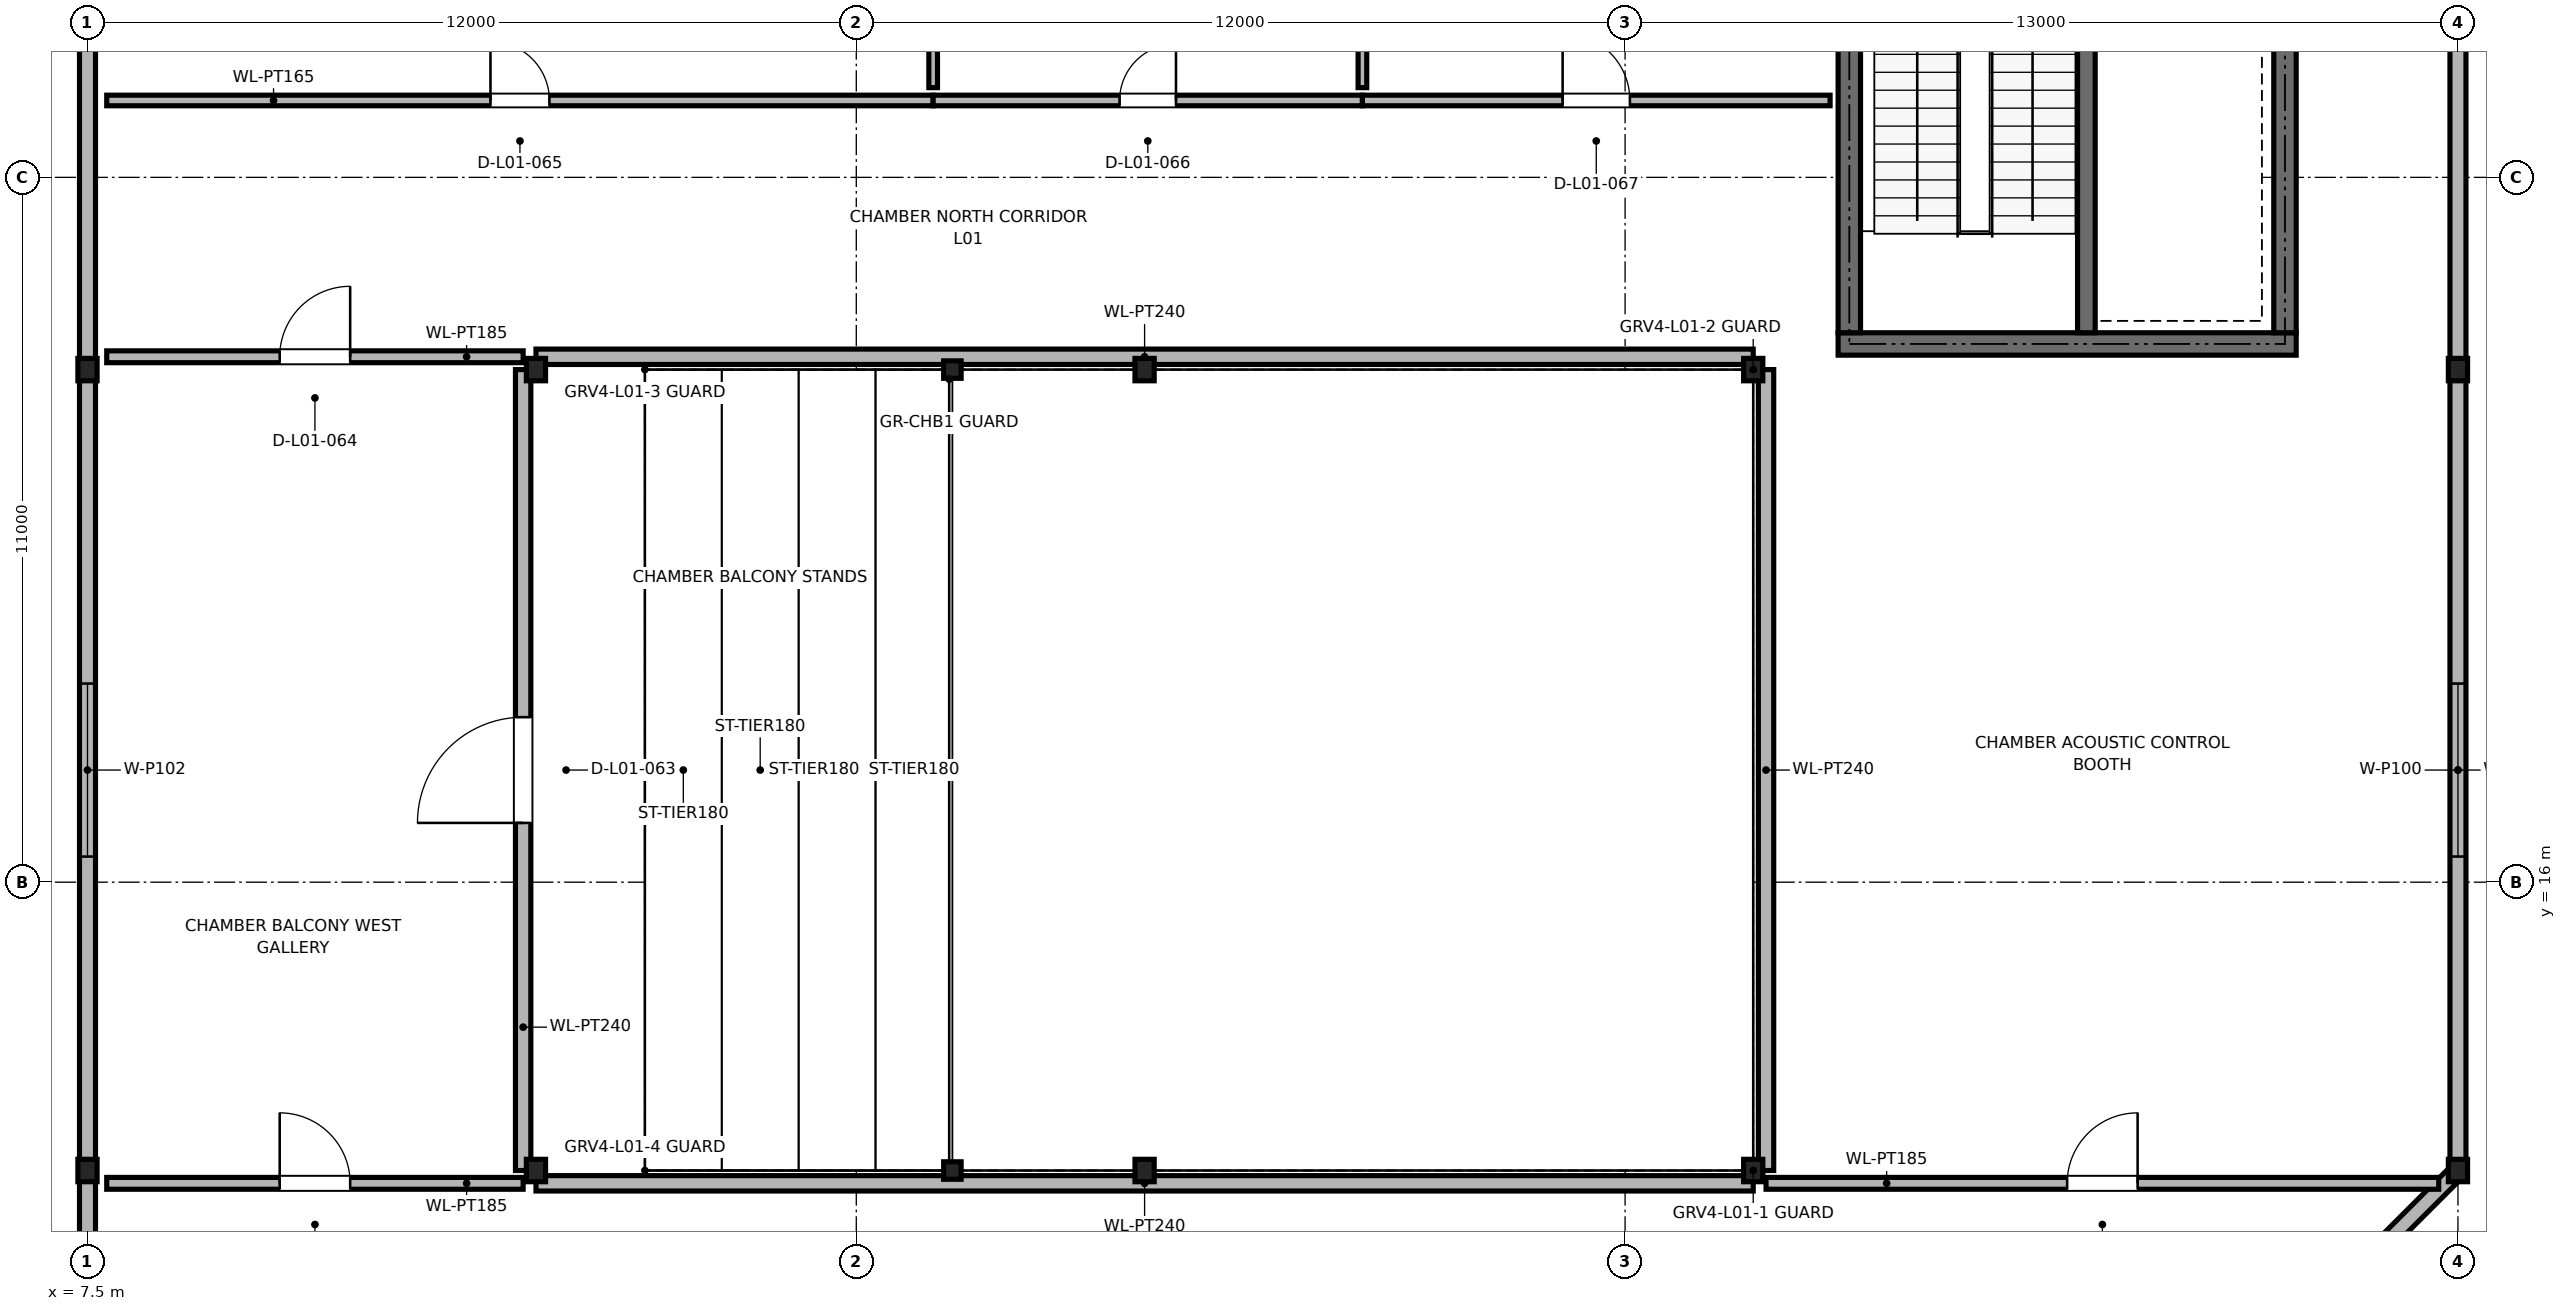
"""IFC4 building model, lengths in metres.
Left out: names, types, materials, properties, quantities, classifications, styles, units other than length and angle.
Written with IfcOpenShell. Run it as: python <this file> out.ifc"""

import sys

from ifc_helpers import new_model, si_unit, direction, frame, frame_2d, origin, origin_2d, place, context, subcontext, project, spatial, rectangle, hollow_circle, i_section, extrude, element, fill, save


model = new_model("IFC4")
c1 = context("Model", 3, precision=1e-05, world=origin(), true_north=direction((0.0, 1.0)))
c2 = subcontext(c1, "Body", "Model", "MODEL_VIEW")
j1 = project(units=[si_unit("LENGTHUNIT", "METRE"), si_unit("PLANEANGLEUNIT", "RADIAN")], contexts=[c1])
p1 = place(None, origin())
s1 = spatial("IfcSite", under=j1, at=p1, CompositionType="ELEMENT")
p2 = place(p1, origin())
s2 = spatial("IfcBuilding", under=s1, at=p2, CompositionType="ELEMENT")
p3 = place(p2, frame((0.0, 0.0, 4.8)))
s3 = spatial("IfcBuildingStorey", under=s2, at=p3, CompositionType="ELEMENT", Elevation=4.8)
for number, where, z_axis, x_axis in (
    (1, (44.5, 11.5, 0.0), (0.0, 0.0, 1.0), (1.0, 0.0, 0.0)),
    (2, (44.5, 24.0, 0.0), (0.0, 0.0, 1.0), (1.0, 0.0, 0.0)),
    (3, (7.5, 24.0, 0.0), (0.0, 0.0, 1.0), (1.0, 0.0, 0.0)),
    (4, (7.5, 11.5, 0.0), (0.0, 0.0, 1.0), (1.0, 0.0, 0.0)),
    (5, (14.5, 11.5, 0.0), (0.0, 0.0, 1.0), (1.0, 0.0, 0.0)),
    (6, (24.0, 11.5, 0.0), (0.0, 0.0, 1.0), (1.0, 0.0, 0.0)),
    (7, (33.5, 11.5, 0.0), (0.0, 0.0, 1.0), (1.0, 0.0, 0.0)),
    (8, (14.5, 24.0, 0.0), (0.0, 0.0, 1.0), (1.0, 0.0, 0.0)),
    (9, (24.0, 24.0, 0.0), (0.0, 0.0, 1.0), (1.0, 0.0, 0.0)),
    (10, (33.5, 24.0, 0.0), (0.0, 0.0, 1.0), (1.0, 0.0, 0.0)),
):
    element("IfcColumn", number, at=place(p3, frame(where, z_axis=z_axis, x_axis=x_axis)), inside=s3, PredefinedType="COLUMN", context=c2, shape_type="SweptSolid", body=[
        extrude(i_section(OverallWidth=0.3, OverallDepth=0.35, WebThickness=0.01, FlangeThickness=0.018, FilletRadius=0.027, at=origin_2d()), origin(), (0.0, 0.0, 1.0), 4.8),
    ])
for number, where, z_axis, x_axis in (
    (11, (21.0, 11.5, 0.0), (0.0, 0.0, 1.0), (1.0, 0.0, 0.0)),
    (12, (21.0, 24.0, 0.0), (0.0, 0.0, 1.0), (1.0, 0.0, 0.0)),
):
    element("IfcColumn", number, at=place(p3, frame(where, z_axis=z_axis, x_axis=x_axis)), inside=s3, PredefinedType="COLUMN", context=c2, shape_type="SweptSolid", body=[
        extrude(hollow_circle(Radius=0.136, WallThickness=0.016, at=origin_2d()), origin(), (0.0, 0.0, 1.0), 0.96),
    ])
p4 = place(p3, frame((44.486, 11.486, 0.0), z_axis=(0.0, 0.0, 1.0), x_axis=(-0.707106781187, -0.707106781187, 0.0)))
e13 = element("IfcWall", 13, at=p4, inside=s3, PredefinedType="SOLIDWALL", context=c2, shape_type="SweptSolid", body=[
    extrude(rectangle(XDim=9.152, YDim=0.25, at=frame_2d((4.576, 0.0))), origin(), (0.0, 0.0, 1.0), 4.028),
])
p5 = place(p3, frame((44.5, 23.98, 0.0), z_axis=(0.0, 0.0, 1.0), x_axis=(0.0, -1.0, 0.0)))
e14 = element("IfcWall", 14, at=p5, inside=s3, PredefinedType="SOLIDWALL", context=c2, shape_type="SweptSolid", body=[
    extrude(rectangle(XDim=12.46, YDim=0.25, at=frame_2d((6.23, 0.0))), origin(), (0.0, 0.0, 1.0), 4.028),
])
p6 = place(p5, frame((4.88, 0.0, 0.85)))
e15 = element("IfcOpeningElement", 15, at=p6, cuts=e14, PredefinedType="OPENING", context=c2, shape_type="SweptSolid", body=[
    extrude(rectangle(XDim=2.7, YDim=1.7, at=frame_2d((1.35, 0.85))), frame((0.0, 0.135, 0.0), z_axis=(0.0, -1.0, 0.0), x_axis=(1.0, 0.0, 0.0)), (0.0, 0.0, 1.0), 0.27),
])
p7 = place(p3, frame((44.5, 29.98, 0.0), z_axis=(0.0, 0.0, 1.0), x_axis=(0.0, -1.0, 0.0)))
e16 = element("IfcWall", 16, at=p7, inside=s3, PredefinedType="SOLIDWALL", context=c2, shape_type="SweptSolid", body=[
    extrude(rectangle(XDim=5.96, YDim=0.25, at=frame_2d((2.98, 0.0))), origin(), (0.0, 0.0, 1.0), 4.078),
])
p8 = place(p3, frame((7.5, 24.02, 0.0), z_axis=(0.0, 0.0, 1.0), x_axis=(0.0, 1.0, 0.0)))
e17 = element("IfcWall", 17, at=p8, inside=s3, PredefinedType="SOLIDWALL", context=c2, shape_type="SweptSolid", body=[
    extrude(rectangle(XDim=13.96, YDim=0.25, at=frame_2d((6.98, 0.0))), origin(), (0.0, 0.0, 1.0), 4.078),
])
p9 = place(p3, frame((7.5, 11.52, 0.0), z_axis=(0.0, 0.0, 1.0), x_axis=(0.0, 1.0, 0.0)))
e18 = element("IfcWall", 18, at=p9, inside=s3, PredefinedType="SOLIDWALL", context=c2, shape_type="SweptSolid", body=[
    extrude(rectangle(XDim=12.46, YDim=0.25, at=frame_2d((6.23, 0.0))), origin(), (0.0, 0.0, 1.0), 4.078),
])
p10 = place(p9, frame((4.88, 0.0, 0.85)))
e19 = element("IfcOpeningElement", 19, at=p10, cuts=e18, PredefinedType="OPENING", context=c2, shape_type="SweptSolid", body=[
    extrude(rectangle(XDim=2.7, YDim=1.7, at=frame_2d((1.35, 0.85))), frame((0.0, 0.135, 0.0), z_axis=(0.0, -1.0, 0.0), x_axis=(1.0, 0.0, 0.0)), (0.0, 0.0, 1.0), 0.27),
])
p11 = place(p3, frame((7.5, 5.02, 0.0), z_axis=(0.0, 0.0, 1.0), x_axis=(0.0, 1.0, 0.0)))
e20 = element("IfcWall", 20, at=p11, inside=s3, PredefinedType="SOLIDWALL", context=c2, shape_type="SweptSolid", body=[
    extrude(rectangle(XDim=6.46, YDim=0.25, at=frame_2d((3.23, 0.0))), origin(), (0.0, 0.0, 1.0), 4.078),
])
p12 = place(p3, frame((34.825, 24.4, 0.0), z_axis=(0.0, 0.0, 1.0), x_axis=(1.0, 0.0, 0.0)))
e21 = element("IfcWall", 21, at=p12, inside=s3, PredefinedType="SHEAR", context=c2, shape_type="SweptSolid", body=[
    extrude(rectangle(XDim=7.15, YDim=0.35, at=frame_2d((3.575, 0.0))), origin(), (0.0, 0.0, 1.0), 4.54),
])
for number, where, z_axis, x_axis in (
    (22, (35.0, 24.575, 0.0), (0.0, 0.0, 1.0), (0.0, 1.0, 0.0)),
    (23, (41.8, 24.575, 0.0), (0.0, 0.0, 1.0), (0.0, 1.0, 0.0)),
):
    element("IfcWall", number, at=place(p3, frame(where, z_axis=z_axis, x_axis=x_axis)), inside=s3, PredefinedType="SHEAR", context=c2, shape_type="SweptSolid", body=[
        extrude(rectangle(XDim=11.2, YDim=0.35, at=frame_2d((5.6, 0.0))), origin(), (0.0, 0.0, 1.0), 4.54),
    ])
p13 = place(p3, frame((38.7, 24.575, 0.0), z_axis=(0.0, 0.0, 1.0), x_axis=(0.0, 1.0, 0.0)))
e24 = element("IfcWall", 24, at=p13, inside=s3, PredefinedType="SHEAR", context=c2, shape_type="SweptSolid", body=[
    extrude(rectangle(XDim=6.637, YDim=0.275, at=frame_2d((3.319, 0.0))), origin(), (0.0, 0.0, 1.0), 4.54),
])
p14 = place(p3, frame((7.8, 11.3, 0.0), z_axis=(0.0, 0.0, 1.0), x_axis=(1.0, 0.0, 0.0)))
e25 = element("IfcWall", 25, at=p14, inside=s3, PredefinedType="PARTITIONING", context=c2, shape_type="SweptSolid", body=[
    extrude(rectangle(XDim=6.5, YDim=0.185, at=frame_2d((3.25, 0.0))), origin(), (0.0, 0.0, 1.0), 4.08),
])
p15 = place(p14, frame((2.7, 0.0, 0.0)))
e26 = element("IfcOpeningElement", 26, at=p15, cuts=e25, PredefinedType="OPENING", context=c2, shape_type="SweptSolid", body=[
    extrude(rectangle(XDim=1.1, YDim=2.15, at=frame_2d((0.55, 1.075))), frame((0.0, 0.103, 0.0), z_axis=(0.0, -1.0, 0.0), x_axis=(1.0, 0.0, 0.0)), (0.0, 0.0, 1.0), 0.205),
])
p16 = place(p3, frame((14.5, 11.3, 0.0), z_axis=(0.0, 0.0, 1.0), x_axis=(1.0, 0.0, 0.0)))
e27 = element("IfcWall", 27, at=p16, inside=s3, PredefinedType="PARTITIONING", context=c2, shape_type="SweptSolid", body=[
    extrude(rectangle(XDim=19.0, YDim=0.24, at=frame_2d((9.5, 0.0))), origin(), (0.0, 0.0, 1.0), 4.08),
])
p17 = place(p3, frame((33.7, 11.3, 0.0), z_axis=(0.0, 0.0, 1.0), x_axis=(1.0, 0.0, 0.0)))
e28 = element("IfcWall", 28, at=p17, inside=s3, PredefinedType="PARTITIONING", context=c2, shape_type="SweptSolid", body=[
    extrude(rectangle(XDim=10.5, YDim=0.185, at=frame_2d((5.25, 0.0))), origin(), (0.0, 0.0, 1.0), 4.03),
])
p18 = place(p17, frame((4.7, 0.0, 0.0)))
e29 = element("IfcOpeningElement", 29, at=p18, cuts=e28, PredefinedType="OPENING", context=c2, shape_type="SweptSolid", body=[
    extrude(rectangle(XDim=1.1, YDim=2.15, at=frame_2d((0.55, 1.075))), frame((0.0, 0.103, 0.0), z_axis=(0.0, -1.0, 0.0), x_axis=(1.0, 0.0, 0.0)), (0.0, 0.0, 1.0), 0.205),
])
p19 = place(p3, frame((14.3, 11.5, 0.0), z_axis=(0.0, 0.0, 1.0), x_axis=(0.0, 1.0, 0.0)))
e30 = element("IfcWall", 30, at=p19, inside=s3, PredefinedType="PARTITIONING", context=c2, shape_type="SweptSolid", body=[
    extrude(rectangle(XDim=12.5, YDim=0.24, at=frame_2d((6.25, 0.0))), origin(), (0.0, 0.0, 1.0), 4.08),
])
p20 = place(p19, frame((5.425, 0.0, 0.0)))
e31 = element("IfcOpeningElement", 31, at=p20, cuts=e30, PredefinedType="OPENING", context=c2, shape_type="SweptSolid", body=[
    extrude(rectangle(XDim=1.65, YDim=2.2, at=frame_2d((0.825, 1.1))), frame((0.0, 0.13, 0.0), z_axis=(0.0, -1.0, 0.0), x_axis=(1.0, 0.0, 0.0)), (0.0, 0.0, 1.0), 0.26),
])
p21 = place(p3, frame((33.7, 11.5, 0.0), z_axis=(0.0, 0.0, 1.0), x_axis=(0.0, 1.0, 0.0)))
e32 = element("IfcWall", 32, at=p21, inside=s3, PredefinedType="PARTITIONING", context=c2, shape_type="SweptSolid", body=[
    extrude(rectangle(XDim=12.5, YDim=0.24, at=frame_2d((6.25, 0.0))), origin(), (0.0, 0.0, 1.0), 4.08),
])
p22 = place(p3, frame((7.8, 24.2, 0.0), z_axis=(0.0, 0.0, 1.0), x_axis=(1.0, 0.0, 0.0)))
e33 = element("IfcWall", 33, at=p22, inside=s3, PredefinedType="PARTITIONING", context=c2, shape_type="SweptSolid", body=[
    extrude(rectangle(XDim=6.5, YDim=0.185, at=frame_2d((3.25, 0.0))), origin(), (0.0, 0.0, 1.0), 4.08),
])
p23 = place(p22, frame((2.7, 0.0, 0.0)))
e34 = element("IfcOpeningElement", 34, at=p23, cuts=e33, PredefinedType="OPENING", context=c2, shape_type="SweptSolid", body=[
    extrude(rectangle(XDim=1.1, YDim=2.15, at=frame_2d((0.55, 1.075))), frame((0.0, 0.103, 0.0), z_axis=(0.0, -1.0, 0.0), x_axis=(1.0, 0.0, 0.0)), (0.0, 0.0, 1.0), 0.205),
])
p24 = place(p3, frame((14.5, 24.2, 0.0), z_axis=(0.0, 0.0, 1.0), x_axis=(1.0, 0.0, 0.0)))
e35 = element("IfcWall", 35, at=p24, inside=s3, PredefinedType="PARTITIONING", context=c2, shape_type="SweptSolid", body=[
    extrude(rectangle(XDim=19.0, YDim=0.24, at=frame_2d((9.5, 0.0))), origin(), (0.0, 0.0, 1.0), 4.08),
])
p25 = place(p3, frame((7.8, 28.2, 0.0), z_axis=(0.0, 0.0, 1.0), x_axis=(1.0, 0.0, 0.0)))
e36 = element("IfcWall", 36, at=p25, inside=s3, PredefinedType="PARTITIONING", context=c2, shape_type="SweptSolid", body=[
    extrude(rectangle(XDim=12.9, YDim=0.165, at=frame_2d((6.45, 0.0))), origin(), (0.0, 0.0, 1.0), 4.08),
])
p26 = place(p25, frame((5.99, 0.0, 0.0)))
e37 = element("IfcOpeningElement", 37, at=p26, cuts=e36, PredefinedType="OPENING", context=c2, shape_type="SweptSolid", body=[
    extrude(rectangle(XDim=0.92, YDim=2.1, at=frame_2d((0.46, 1.05))), frame((0.0, 0.093, 0.0), z_axis=(0.0, -1.0, 0.0), x_axis=(1.0, 0.0, 0.0)), (0.0, 0.0, 1.0), 0.185),
])
p27 = place(p3, frame((20.7, 28.2, 0.0), z_axis=(0.0, 0.0, 1.0), x_axis=(1.0, 0.0, 0.0)))
e38 = element("IfcWall", 38, at=p27, inside=s3, PredefinedType="PARTITIONING", context=c2, shape_type="SweptSolid", body=[
    extrude(rectangle(XDim=6.7, YDim=0.165, at=frame_2d((3.35, 0.0))), origin(), (0.0, 0.0, 1.0), 4.08),
])
p28 = place(p27, frame((2.91, 0.0, 0.0)))
e39 = element("IfcOpeningElement", 39, at=p28, cuts=e38, PredefinedType="OPENING", context=c2, shape_type="SweptSolid", body=[
    extrude(rectangle(XDim=0.88, YDim=2.1, at=frame_2d((0.44, 1.05))), frame((0.0, 0.093, 0.0), z_axis=(0.0, -1.0, 0.0), x_axis=(1.0, 0.0, 0.0)), (0.0, 0.0, 1.0), 0.185),
])
p29 = place(p3, frame((27.4, 28.2, 0.0), z_axis=(0.0, 0.0, 1.0), x_axis=(1.0, 0.0, 0.0)))
e40 = element("IfcWall", 40, at=p29, inside=s3, PredefinedType="PARTITIONING", context=c2, shape_type="SweptSolid", body=[
    extrude(rectangle(XDim=7.3, YDim=0.165, at=frame_2d((3.65, 0.0))), origin(), (0.0, 0.0, 1.0), 4.08),
])
p30 = place(p29, frame((3.125, 0.0, 0.0)))
e41 = element("IfcOpeningElement", 41, at=p30, cuts=e40, PredefinedType="OPENING", context=c2, shape_type="SweptSolid", body=[
    extrude(rectangle(XDim=1.05, YDim=2.15, at=frame_2d((0.525, 1.075))), frame((0.0, 0.093, 0.0), z_axis=(0.0, -1.0, 0.0), x_axis=(1.0, 0.0, 0.0)), (0.0, 0.0, 1.0), 0.185),
])
for number, where, z_axis, x_axis in (
    (42, (20.7, 28.4, 0.0), (0.0, 0.0, 1.0), (0.0, 1.0, 0.0)),
    (43, (27.4, 28.4, 0.0), (0.0, 0.0, 1.0), (0.0, 1.0, 0.0)),
):
    element("IfcWall", number, at=place(p3, frame(where, z_axis=z_axis, x_axis=x_axis)), inside=s3, PredefinedType="PARTITIONING", context=c2, shape_type="SweptSolid", body=[
        extrude(rectangle(XDim=9.3, YDim=0.135, at=frame_2d((4.65, 0.0))), origin(), (0.0, 0.0, 1.0), 4.29),
    ])
p31 = place(p6, origin())
e44 = element("IfcWindow", 44, at=p31, inside=s3, PartitioningType="SINGLE_PANEL", PredefinedType="WINDOW", context=c2, shape_type="SweptSolid", body=[
    extrude(rectangle(XDim=2.7, YDim=1.7, at=frame_2d((1.35, 0.85))), frame((0.0, 0.03, 0.0), z_axis=(0.0, -1.0, 0.0), x_axis=(1.0, 0.0, 0.0)), (0.0, 0.0, 1.0), 0.06),
])
fill(e15, e44)
p32 = place(p10, origin())
e45 = element("IfcWindow", 45, at=p32, inside=s3, PartitioningType="SINGLE_PANEL", PredefinedType="WINDOW", context=c2, shape_type="SweptSolid", body=[
    extrude(rectangle(XDim=2.7, YDim=1.7, at=frame_2d((1.35, 0.85))), frame((0.0, 0.03, 0.0), z_axis=(0.0, -1.0, 0.0), x_axis=(1.0, 0.0, 0.0)), (0.0, 0.0, 1.0), 0.06),
])
fill(e19, e45)
p33 = place(p15, origin())
e46 = element("IfcDoor", 46, at=p33, inside=s3, OperationType="SINGLE_SWING_LEFT", PredefinedType="DOOR", context=c2, shape_type="SweptSolid", body=[
    extrude(rectangle(XDim=1.1, YDim=2.15, at=frame_2d((0.55, 1.075))), frame((0.0, 0.025, 0.0), z_axis=(0.0, -1.0, 0.0), x_axis=(1.0, 0.0, 0.0)), (0.0, 0.0, 1.0), 0.05),
])
fill(e26, e46)
p34 = place(p18, origin())
e47 = element("IfcDoor", 47, at=p34, inside=s3, OperationType="SINGLE_SWING_RIGHT", PredefinedType="DOOR", context=c2, shape_type="SweptSolid", body=[
    extrude(rectangle(XDim=1.1, YDim=2.15, at=frame_2d((0.55, 1.075))), frame((0.0, 0.025, 0.0), z_axis=(0.0, -1.0, 0.0), x_axis=(1.0, 0.0, 0.0)), (0.0, 0.0, 1.0), 0.05),
])
fill(e29, e47)
p35 = place(p20, origin())
e48 = element("IfcDoor", 48, at=p35, inside=s3, OperationType="SINGLE_SWING_LEFT", PredefinedType="DOOR", context=c2, shape_type="SweptSolid", body=[
    extrude(rectangle(XDim=1.65, YDim=2.2, at=frame_2d((0.825, 1.1))), frame((0.0, 0.025, 0.0), z_axis=(0.0, -1.0, 0.0), x_axis=(1.0, 0.0, 0.0)), (0.0, 0.0, 1.0), 0.05),
])
fill(e31, e48)
p36 = place(p23, origin())
e49 = element("IfcDoor", 49, at=p36, inside=s3, OperationType="SINGLE_SWING_RIGHT", PredefinedType="DOOR", context=c2, shape_type="SweptSolid", body=[
    extrude(rectangle(XDim=1.1, YDim=2.15, at=frame_2d((0.55, 1.075))), frame((0.0, 0.025, 0.0), z_axis=(0.0, -1.0, 0.0), x_axis=(1.0, 0.0, 0.0)), (0.0, 0.0, 1.0), 0.05),
])
fill(e34, e49)
p37 = place(p26, origin())
e50 = element("IfcDoor", 50, at=p37, inside=s3, OperationType="SINGLE_SWING_LEFT", PredefinedType="DOOR", context=c2, shape_type="SweptSolid", body=[
    extrude(rectangle(XDim=0.92, YDim=2.1, at=frame_2d((0.46, 1.05))), frame((0.0, 0.025, 0.0), z_axis=(0.0, -1.0, 0.0), x_axis=(1.0, 0.0, 0.0)), (0.0, 0.0, 1.0), 0.05),
])
fill(e37, e50)
p38 = place(p28, origin())
e51 = element("IfcDoor", 51, at=p38, inside=s3, OperationType="SINGLE_SWING_RIGHT", PredefinedType="DOOR", context=c2, shape_type="SweptSolid", body=[
    extrude(rectangle(XDim=0.88, YDim=2.1, at=frame_2d((0.44, 1.05))), frame((0.0, 0.025, 0.0), z_axis=(0.0, -1.0, 0.0), x_axis=(1.0, 0.0, 0.0)), (0.0, 0.0, 1.0), 0.05),
])
fill(e39, e51)
p39 = place(p30, origin())
e52 = element("IfcDoor", 52, at=p39, inside=s3, OperationType="SINGLE_SWING_LEFT", PredefinedType="DOOR", context=c2, shape_type="SweptSolid", body=[
    extrude(rectangle(XDim=1.05, YDim=2.15, at=frame_2d((0.525, 1.075))), frame((0.0, 0.025, 0.0), z_axis=(0.0, -1.0, 0.0), x_axis=(1.0, 0.0, 0.0)), (0.0, 0.0, 1.0), 0.05),
])
fill(e41, e52)
save(model, sys.argv[1])
